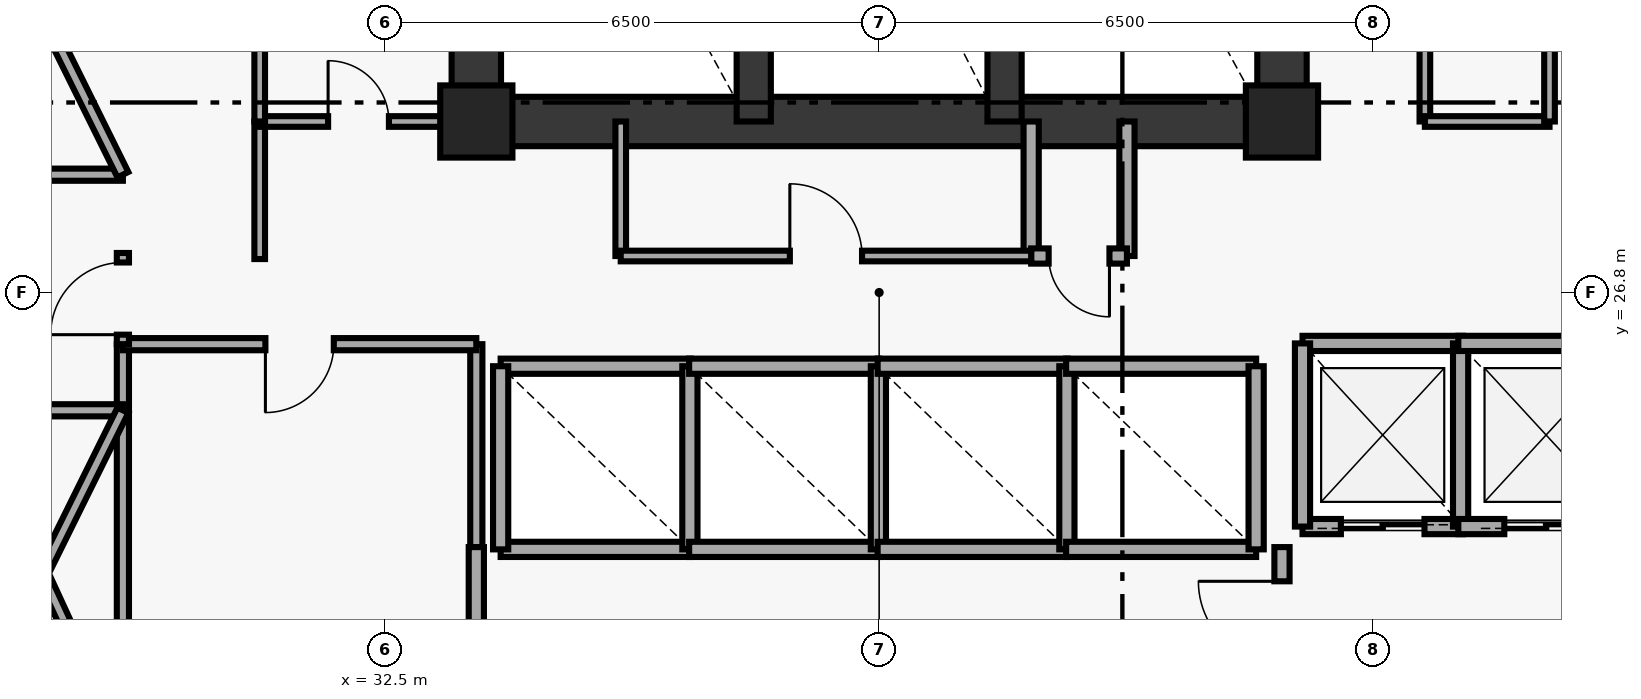
"""IFC4 building model, lengths in metres.
Left out: names, types, materials, properties, quantities, classifications, styles, units other than length and angle.
Written with IfcOpenShell. Run it as: python <this file> out.ifc"""

import sys

from ifc_helpers import new_model, si_unit, direction, frame, frame_2d, origin, origin_2d, place, context, subcontext, project, spatial, rectangle, extrude, element, fill, save


model = new_model("IFC4")
c1 = context("Model", 3, precision=1e-05, world=origin(), true_north=direction((0.0, 1.0)))
c2 = subcontext(c1, "Body", "Model", "MODEL_VIEW")
j1 = project(units=[si_unit("LENGTHUNIT", "METRE"), si_unit("PLANEANGLEUNIT", "RADIAN")], contexts=[c1])
p1 = place(None, origin())
s1 = spatial("IfcSite", under=j1, at=p1, CompositionType="ELEMENT")
p2 = place(p1, origin())
s2 = spatial("IfcBuilding", under=s1, at=p2, CompositionType="ELEMENT")
p3 = place(p2, frame((0.0, 0.0, 192.25)))
s3 = spatial("IfcBuildingStorey", under=s2, at=p3, CompositionType="ELEMENT", Elevation=192.25)
for number, where, z_axis, x_axis in (
    (1, (44.3, 29.05, 0.0), (0.0, 0.0, 1.0), (1.0, 0.0, 0.0)),
    (2, (33.7, 29.05, 0.0), (0.0, 0.0, 1.0), (1.0, 0.0, 0.0)),
):
    element("IfcColumn", number, at=place(p3, frame(where, z_axis=z_axis, x_axis=x_axis)), inside=s3, PredefinedType="PILASTER", context=c2, shape_type="SweptSolid", body=[
        extrude(rectangle(XDim=0.95, YDim=0.95, at=origin_2d()), origin(), (0.0, 0.0, 1.0), 3.35),
    ])
for number, where, z_axis, x_axis in (
    (3, (33.7, 29.05, 0.0), (0.0, 0.0, 1.0), (0.0, 1.0, 0.0)),
    (4, (44.3, 29.05, 0.0), (0.0, 0.0, 1.0), (0.0, 1.0, 0.0)),
):
    element("IfcWall", number, at=place(p3, frame(where, z_axis=z_axis, x_axis=x_axis)), inside=s3, PredefinedType="SHEAR", context=c2, shape_type="SweptSolid", body=[
        extrude(rectangle(XDim=8.35, YDim=0.65, at=frame_2d((4.175, 0.0))), origin(), (0.0, 0.0, 1.0), 3.35),
    ])
p4 = place(p3, frame((33.7, 29.05, 0.0), z_axis=(0.0, 0.0, 1.0), x_axis=(1.0, 0.0, 0.0)))
e5 = element("IfcWall", 5, at=p4, inside=s3, PredefinedType="SHEAR", context=c2, shape_type="SweptSolid", body=[
    extrude(rectangle(XDim=10.6, YDim=0.65, at=frame_2d((5.3, 0.0))), origin(), (0.0, 0.0, 1.0), 3.35),
])
for number, where, z_axis, x_axis in (
    (6, (37.35, 29.05, 0.0), (0.0, 0.0, 1.0), (0.0, 1.0, 0.0)),
    (7, (40.65, 29.05, 0.0), (0.0, 0.0, 1.0), (0.0, 1.0, 0.0)),
):
    element("IfcWall", number, at=place(p3, frame(where, z_axis=z_axis, x_axis=x_axis)), inside=s3, PredefinedType="SHEAR", context=c2, shape_type="SweptSolid", body=[
        extrude(rectangle(XDim=8.35, YDim=0.45, at=frame_2d((4.175, 0.0))), origin(), (0.0, 0.0, 1.0), 3.35),
    ])
p5 = place(p3, frame((35.6, 27.28, 0.0), z_axis=(0.0, 0.0, 1.0), x_axis=(0.0, 1.0, 0.0)))
e8 = element("IfcWall", 8, at=p5, inside=s3, PredefinedType="PARTITIONING", context=c2, shape_type="SweptSolid", body=[
    extrude(rectangle(XDim=1.77, YDim=0.14, at=frame_2d((0.885, 0.0))), origin(), (0.0, 0.0, 1.0), 3.35),
])
for number, where, z_axis, x_axis in (
    (9, (41.0, 27.28, 0.0), (0.0, 0.0, 1.0), (0.0, 1.0, 0.0)),
    (10, (42.26, 27.28, 0.0), (0.0, 0.0, 1.0), (0.0, 1.0, 0.0)),
):
    element("IfcWall", number, at=place(p3, frame(where, z_axis=z_axis, x_axis=x_axis)), inside=s3, PredefinedType="SOLIDWALL", context=c2, shape_type="SweptSolid", body=[
        extrude(rectangle(XDim=1.77, YDim=0.2, at=frame_2d((0.885, 0.0))), origin(), (0.0, 0.0, 1.0), 3.35),
    ])
p6 = place(p3, frame((41.0, 27.28, 0.0), z_axis=(0.0, 0.0, 1.0), x_axis=(1.0, 0.0, 0.0)))
e11 = element("IfcWall", 11, at=p6, inside=s3, PredefinedType="SOLIDWALL", context=c2, shape_type="SweptSolid", body=[
    extrude(rectangle(XDim=1.26, YDim=0.2, at=frame_2d((0.63, 0.0))), origin(), (0.0, 0.0, 1.0), 3.35),
])
p7 = place(p6, frame((0.23, 0.0, 0.0)))
e12 = element("IfcOpeningElement", 12, at=p7, cuts=e11, PredefinedType="OPENING", context=c2, shape_type="SweptSolid", body=[
    extrude(rectangle(XDim=0.8, YDim=2.05, at=frame_2d((0.4, 1.025))), frame((0.0, 0.11, 0.0), z_axis=(0.0, -1.0, 0.0), x_axis=(1.0, 0.0, 0.0)), (0.0, 0.0, 1.0), 0.22),
])
p8 = place(p3, frame((44.57, 23.72, 0.0), z_axis=(0.0, 0.0, 1.0), x_axis=(1.0, 0.0, 0.0)))
e13 = element("IfcWall", 13, at=p8, inside=s3, PredefinedType="SOLIDWALL", context=c2, shape_type="SweptSolid", body=[
    extrude(rectangle(XDim=2.11, YDim=0.2, at=frame_2d((1.055, 0.0))), origin(), (0.0, 0.0, 1.0), 3.35),
])
p9 = place(p8, frame((0.505, 0.0, 0.0)))
e14 = element("IfcOpeningElement", 14, at=p9, cuts=e13, PredefinedType="OPENING", context=c2, shape_type="SweptSolid", body=[
    extrude(rectangle(XDim=1.1, YDim=2.15, at=frame_2d((0.55, 1.075))), frame((0.0, 0.11, 0.0), z_axis=(0.0, -1.0, 0.0), x_axis=(1.0, 0.0, 0.0)), (0.0, 0.0, 1.0), 0.22),
])
p10 = place(p3, frame((44.57, 26.13, 0.0), z_axis=(0.0, 0.0, 1.0), x_axis=(1.0, 0.0, 0.0)))
e15 = element("IfcWall", 15, at=p10, inside=s3, PredefinedType="SOLIDWALL", context=c2, shape_type="SweptSolid", body=[
    extrude(rectangle(XDim=2.11, YDim=0.2, at=frame_2d((1.055, 0.0))), origin(), (0.0, 0.0, 1.0), 3.35),
])
for number, where, z_axis, x_axis in (
    (16, (44.57, 23.72, 0.0), (0.0, 0.0, 1.0), (0.0, 1.0, 0.0)),
    (17, (46.65, 23.72, 0.0), (0.0, 0.0, 1.0), (0.0, 1.0, 0.0)),
):
    element("IfcWall", number, at=place(p3, frame(where, z_axis=z_axis, x_axis=x_axis)), inside=s3, PredefinedType="SOLIDWALL", context=c2, shape_type="SweptSolid", body=[
        extrude(rectangle(XDim=2.41, YDim=0.2, at=frame_2d((1.205, 0.0))), origin(), (0.0, 0.0, 1.0), 3.35),
    ])
p11 = place(p3, frame((46.62, 23.72, 0.0), z_axis=(0.0, 0.0, 1.0), x_axis=(1.0, 0.0, 0.0)))
e18 = element("IfcWall", 18, at=p11, inside=s3, PredefinedType="SOLIDWALL", context=c2, shape_type="SweptSolid", body=[
    extrude(rectangle(XDim=2.31, YDim=0.2, at=frame_2d((1.155, 0.0))), origin(), (0.0, 0.0, 1.0), 3.35),
])
p12 = place(p11, frame((0.605, 0.0, 0.0)))
e19 = element("IfcOpeningElement", 19, at=p12, cuts=e18, PredefinedType="OPENING", context=c2, shape_type="SweptSolid", body=[
    extrude(rectangle(XDim=1.1, YDim=2.15, at=frame_2d((0.55, 1.075))), frame((0.0, 0.11, 0.0), z_axis=(0.0, -1.0, 0.0), x_axis=(1.0, 0.0, 0.0)), (0.0, 0.0, 1.0), 0.22),
])
p13 = place(p3, frame((46.62, 26.13, 0.0), z_axis=(0.0, 0.0, 1.0), x_axis=(1.0, 0.0, 0.0)))
e20 = element("IfcWall", 20, at=p13, inside=s3, PredefinedType="SOLIDWALL", context=c2, shape_type="SweptSolid", body=[
    extrude(rectangle(XDim=2.31, YDim=0.2, at=frame_2d((1.155, 0.0))), origin(), (0.0, 0.0, 1.0), 3.35),
])
for number, where, z_axis, x_axis in (
    (21, (34.02, 23.42, 0.0), (0.0, 0.0, 1.0), (1.0, 0.0, 0.0)),
    (22, (34.02, 25.83, 0.0), (0.0, 0.0, 1.0), (1.0, 0.0, 0.0)),
):
    element("IfcWall", number, at=place(p3, frame(where, z_axis=z_axis, x_axis=x_axis)), inside=s3, PredefinedType="SOLIDWALL", context=c2, shape_type="SweptSolid", body=[
        extrude(rectangle(XDim=2.5, YDim=0.2, at=frame_2d((1.25, 0.0))), origin(), (0.0, 0.0, 1.0), 3.35),
    ])
for number, where, z_axis, x_axis in (
    (23, (34.02, 23.42, 0.0), (0.0, 0.0, 1.0), (0.0, 1.0, 0.0)),
    (24, (36.51, 23.42, 0.0), (0.0, 0.0, 1.0), (0.0, 1.0, 0.0)),
):
    element("IfcWall", number, at=place(p3, frame(where, z_axis=z_axis, x_axis=x_axis)), inside=s3, PredefinedType="SOLIDWALL", context=c2, shape_type="SweptSolid", body=[
        extrude(rectangle(XDim=2.41, YDim=0.2, at=frame_2d((1.205, 0.0))), origin(), (0.0, 0.0, 1.0), 3.35),
    ])
for number, where, z_axis, x_axis in (
    (25, (36.5, 23.42, 0.0), (0.0, 0.0, 1.0), (1.0, 0.0, 0.0)),
    (26, (36.5, 25.83, 0.0), (0.0, 0.0, 1.0), (1.0, 0.0, 0.0)),
):
    element("IfcWall", number, at=place(p3, frame(where, z_axis=z_axis, x_axis=x_axis)), inside=s3, PredefinedType="SOLIDWALL", context=c2, shape_type="SweptSolid", body=[
        extrude(rectangle(XDim=2.5, YDim=0.2, at=frame_2d((1.25, 0.0))), origin(), (0.0, 0.0, 1.0), 3.35),
    ])
p14 = place(p3, frame((38.99, 23.42, 0.0), z_axis=(0.0, 0.0, 1.0), x_axis=(0.0, 1.0, 0.0)))
e27 = element("IfcWall", 27, at=p14, inside=s3, PredefinedType="SOLIDWALL", context=c2, shape_type="SweptSolid", body=[
    extrude(rectangle(XDim=2.41, YDim=0.2, at=frame_2d((1.205, 0.0))), origin(), (0.0, 0.0, 1.0), 3.35),
])
for number, where, z_axis, x_axis in (
    (28, (38.98, 23.42, 0.0), (0.0, 0.0, 1.0), (1.0, 0.0, 0.0)),
    (29, (38.98, 25.83, 0.0), (0.0, 0.0, 1.0), (1.0, 0.0, 0.0)),
):
    element("IfcWall", number, at=place(p3, frame(where, z_axis=z_axis, x_axis=x_axis)), inside=s3, PredefinedType="SOLIDWALL", context=c2, shape_type="SweptSolid", body=[
        extrude(rectangle(XDim=2.5, YDim=0.2, at=frame_2d((1.25, 0.0))), origin(), (0.0, 0.0, 1.0), 3.35),
    ])
p15 = place(p3, frame((41.47, 23.42, 0.0), z_axis=(0.0, 0.0, 1.0), x_axis=(0.0, 1.0, 0.0)))
e30 = element("IfcWall", 30, at=p15, inside=s3, PredefinedType="SOLIDWALL", context=c2, shape_type="SweptSolid", body=[
    extrude(rectangle(XDim=2.41, YDim=0.2, at=frame_2d((1.205, 0.0))), origin(), (0.0, 0.0, 1.0), 3.35),
])
for number, where, z_axis, x_axis in (
    (31, (41.46, 23.42, 0.0), (0.0, 0.0, 1.0), (1.0, 0.0, 0.0)),
    (32, (41.46, 25.83, 0.0), (0.0, 0.0, 1.0), (1.0, 0.0, 0.0)),
):
    element("IfcWall", number, at=place(p3, frame(where, z_axis=z_axis, x_axis=x_axis)), inside=s3, PredefinedType="SOLIDWALL", context=c2, shape_type="SweptSolid", body=[
        extrude(rectangle(XDim=2.5, YDim=0.2, at=frame_2d((1.25, 0.0))), origin(), (0.0, 0.0, 1.0), 3.35),
    ])
p16 = place(p3, frame((43.96, 23.42, 0.0), z_axis=(0.0, 0.0, 1.0), x_axis=(0.0, 1.0, 0.0)))
e33 = element("IfcWall", 33, at=p16, inside=s3, PredefinedType="SOLIDWALL", context=c2, shape_type="SweptSolid", body=[
    extrude(rectangle(XDim=2.41, YDim=0.2, at=frame_2d((1.205, 0.0))), origin(), (0.0, 0.0, 1.0), 3.35),
])
p17 = place(p3, frame((29.05, 19.05, 0.0), z_axis=(0.0, 0.0, 1.0), x_axis=(0.0, 1.0, 0.0)))
e34 = element("IfcWall", 34, at=p17, inside=s3, PredefinedType="PARTITIONING", context=c2, shape_type="SweptSolid", body=[
    extrude(rectangle(XDim=7.07, YDim=0.16, at=frame_2d((3.535, 0.0))), origin(), (0.0, 0.0, 1.0), 3.35),
])
p18 = place(p3, frame((33.7, 23.45, 0.0), z_axis=(0.0, 0.0, 1.0), x_axis=(0.0, 1.0, 0.0)))
e35 = element("IfcWall", 35, at=p18, inside=s3, PredefinedType="PARTITIONING", context=c2, shape_type="SweptSolid", body=[
    extrude(rectangle(XDim=2.67, YDim=0.16, at=frame_2d((1.335, 0.0))), origin(), (0.0, 0.0, 1.0), 2.735),
])
p19 = place(p3, frame((33.7, 26.12, 0.0), z_axis=(0.0, 0.0, 1.0), x_axis=(-1.0, 0.0, 0.0)))
e36 = element("IfcWall", 36, at=p19, inside=s3, PredefinedType="PARTITIONING", context=c2, shape_type="SweptSolid", body=[
    extrude(rectangle(XDim=4.65, YDim=0.16, at=frame_2d((2.325, 0.0))), origin(), (0.0, 0.0, 1.0), 3.35),
])
p20 = place(p19, frame((1.875, 0.0, 0.0)))
e37 = element("IfcOpeningElement", 37, at=p20, cuts=e36, PredefinedType="OPENING", context=c2, shape_type="SweptSolid", body=[
    extrude(rectangle(XDim=0.9, YDim=2.1, at=frame_2d((0.45, 1.05))), frame((0.0, 0.09, 0.0), z_axis=(0.0, -1.0, 0.0), x_axis=(1.0, 0.0, 0.0)), (0.0, 0.0, 1.0), 0.18),
])
p21 = place(p3, frame((33.7, 21.3, 0.0), z_axis=(0.0, 0.0, 1.0), x_axis=(0.0, 1.0, 0.0)))
e38 = element("IfcWall", 38, at=p21, inside=s3, PredefinedType="SOLIDWALL", context=c2, shape_type="SweptSolid", body=[
    extrude(rectangle(XDim=2.15, YDim=0.2, at=frame_2d((1.075, 0.0))), origin(), (0.0, 0.0, 1.0), 2.735),
])
p22 = place(p3, frame((44.3, 21.35, 0.0), z_axis=(0.0, 0.0, 1.0), x_axis=(0.0, 1.0, 0.0)))
e39 = element("IfcWall", 39, at=p22, inside=s3, PredefinedType="SOLIDWALL", context=c2, shape_type="SweptSolid", body=[
    extrude(rectangle(XDim=2.1, YDim=0.2, at=frame_2d((1.05, 0.0))), origin(), (0.0, 0.0, 1.0), 2.735),
])
p23 = place(p22, frame((0.55, 0.0, 0.0)))
e40 = element("IfcOpeningElement", 40, at=p23, cuts=e39, PredefinedType="OPENING", context=c2, shape_type="SweptSolid", body=[
    extrude(rectangle(XDim=1.1, YDim=2.15, at=frame_2d((0.55, 1.075))), frame((0.0, 0.11, 0.0), z_axis=(0.0, -1.0, 0.0), x_axis=(1.0, 0.0, 0.0)), (0.0, 0.0, 1.0), 0.22),
])
p24 = place(p3, frame((29.05, 26.12, 0.0), z_axis=(0.0, 0.0, 1.0), x_axis=(0.0, 1.0, 0.0)))
e41 = element("IfcWall", 41, at=p24, inside=s3, PredefinedType="PARTITIONING", context=c2, shape_type="SweptSolid", body=[
    extrude(rectangle(XDim=1.2, YDim=0.16, at=frame_2d((0.6, 0.0))), origin(), (0.0, 0.0, 1.0), 3.35),
])
p25 = place(p24, frame((0.125, 0.0, 0.0)))
e42 = element("IfcOpeningElement", 42, at=p25, cuts=e41, PredefinedType="OPENING", context=c2, shape_type="SweptSolid", body=[
    extrude(rectangle(XDim=0.95, YDim=2.15, at=frame_2d((0.475, 1.075))), frame((0.0, 0.09, 0.0), z_axis=(0.0, -1.0, 0.0), x_axis=(1.0, 0.0, 0.0)), (0.0, 0.0, 1.0), 0.18),
])
p26 = place(p3, frame((35.6, 27.28, 0.0), z_axis=(0.0, 0.0, 1.0), x_axis=(1.0, 0.0, 0.0)))
e43 = element("IfcWall", 43, at=p26, inside=s3, PredefinedType="PARTITIONING", context=c2, shape_type="SweptSolid", body=[
    extrude(rectangle(XDim=5.4, YDim=0.14, at=frame_2d((2.7, 0.0))), origin(), (0.0, 0.0, 1.0), 3.35),
])
p27 = place(p26, frame((2.225, 0.0, 0.0)))
e44 = element("IfcOpeningElement", 44, at=p27, cuts=e43, PredefinedType="OPENING", context=c2, shape_type="SweptSolid", body=[
    extrude(rectangle(XDim=0.95, YDim=2.1, at=frame_2d((0.475, 1.05))), frame((0.0, 0.08, 0.0), z_axis=(0.0, -1.0, 0.0), x_axis=(1.0, 0.0, 0.0)), (0.0, 0.0, 1.0), 0.16),
])
p28 = place(p3, frame((30.85, 27.24, 0.0), z_axis=(0.0, 0.0, 1.0), x_axis=(0.0, 1.0, 0.0)))
e45 = element("IfcWall", 45, at=p28, inside=s3, PredefinedType="PARTITIONING", context=c2, shape_type="SweptSolid", body=[
    extrude(rectangle(XDim=1.81, YDim=0.14, at=frame_2d((0.905, 0.0))), origin(), (0.0, 0.0, 1.0), 3.35),
])
p29 = place(p3, frame((30.85, 29.05, 0.0), z_axis=(0.0, 0.0, 1.0), x_axis=(1.0, 0.0, 0.0)))
e46 = element("IfcWall", 46, at=p29, inside=s3, PredefinedType="PARTITIONING", context=c2, shape_type="SweptSolid", body=[
    extrude(rectangle(XDim=2.6, YDim=0.14, at=frame_2d((1.3, 0.0))), origin(), (0.0, 0.0, 1.0), 2.31),
])
p30 = place(p29, frame((0.9, 0.0, 0.0)))
e47 = element("IfcOpeningElement", 47, at=p30, cuts=e46, PredefinedType="OPENING", context=c2, shape_type="SweptSolid", body=[
    extrude(rectangle(XDim=0.8, YDim=2.05, at=frame_2d((0.4, 1.025))), frame((0.0, 0.08, 0.0), z_axis=(0.0, -1.0, 0.0), x_axis=(1.0, 0.0, 0.0)), (0.0, 0.0, 1.0), 0.16),
])
p31 = place(p3, frame((30.85, 29.05, 0.0), z_axis=(0.0, 0.0, 1.0), x_axis=(0.0, 1.0, 0.0)))
e48 = element("IfcWall", 48, at=p31, inside=s3, PredefinedType="PARTITIONING", context=c2, shape_type="SweptSolid", body=[
    extrude(rectangle(XDim=5.6, YDim=0.14, at=frame_2d((2.8, 0.0))), origin(), (0.0, 0.0, 1.0), 3.35),
])
p32 = place(p3, frame((46.18, 34.05, 0.0), z_axis=(0.0, 0.0, 1.0), x_axis=(0.0, -1.0, 0.0)))
e49 = element("IfcWall", 49, at=p32, inside=s3, PredefinedType="PARTITIONING", context=c2, shape_type="SweptSolid", body=[
    extrude(rectangle(XDim=5.0, YDim=0.14, at=frame_2d((2.5, 0.0))), origin(), (0.0, 0.0, 1.0), 3.35),
])
p33 = place(p32, frame((2.1, 0.0, 0.0)))
e50 = element("IfcOpeningElement", 50, at=p33, cuts=e49, PredefinedType="OPENING", context=c2, shape_type="SweptSolid", body=[
    extrude(rectangle(XDim=0.8, YDim=2.05, at=frame_2d((0.4, 1.025))), frame((0.0, 0.08, 0.0), z_axis=(0.0, -1.0, 0.0), x_axis=(1.0, 0.0, 0.0)), (0.0, 0.0, 1.0), 0.16),
])
p34 = place(p3, frame((46.18, 29.05, 0.0), z_axis=(0.0, 0.0, 1.0), x_axis=(1.0, 0.0, 0.0)))
e51 = element("IfcWall", 51, at=p34, inside=s3, PredefinedType="PARTITIONING", context=c2, shape_type="SweptSolid", body=[
    extrude(rectangle(XDim=1.64, YDim=0.14, at=frame_2d((0.82, 0.0))), origin(), (0.0, 0.0, 1.0), 3.35),
])
p35 = place(p3, frame((47.82, 29.05, 0.0), z_axis=(0.0, 0.0, 1.0), x_axis=(0.0, 1.0, 0.0)))
e52 = element("IfcWall", 52, at=p35, inside=s3, PredefinedType="PARTITIONING", context=c2, shape_type="SweptSolid", body=[
    extrude(rectangle(XDim=5.0, YDim=0.14, at=frame_2d((2.5, 0.0))), origin(), (0.0, 0.0, 1.0), 3.35),
])
p36 = place(p3, frame((27.988, 23.104, 0.0), z_axis=(0.0, 0.0, 1.0), x_axis=(0.418656179426, -0.908144814128, 0.0)))
e53 = element("IfcWall", 53, at=p36, inside=s3, PredefinedType="PARTITIONING", context=c2, shape_type="SweptSolid", body=[
    extrude(rectangle(XDim=7.049, YDim=0.16, at=frame_2d((3.524, 0.0))), origin(), (0.0, 0.0, 1.0), 3.35),
])
p37 = place(p3, frame((26.05, 28.35, 0.0), z_axis=(0.0, 0.0, 1.0), x_axis=(1.0, 0.0, 0.0)))
e54 = element("IfcWall", 54, at=p37, inside=s3, PredefinedType="PARTITIONING", context=c2, shape_type="SweptSolid", body=[
    extrude(rectangle(XDim=3.0, YDim=0.16, at=frame_2d((1.5, 0.0))), origin(), (0.0, 0.0, 1.0), 2.31),
])
p38 = place(p37, frame((0.65, 0.0, 0.0)))
e55 = element("IfcOpeningElement", 55, at=p38, cuts=e54, PredefinedType="OPENING", context=c2, shape_type="SweptSolid", body=[
    extrude(rectangle(XDim=1.05, YDim=2.15, at=frame_2d((0.525, 1.075))), frame((0.0, 0.09, 0.0), z_axis=(0.0, -1.0, 0.0), x_axis=(1.0, 0.0, 0.0)), (0.0, 0.0, 1.0), 0.18),
])
p39 = place(p3, frame((26.05, 25.25, 0.0), z_axis=(0.0, 0.0, 1.0), x_axis=(1.0, 0.0, 0.0)))
e56 = element("IfcWall", 56, at=p39, inside=s3, PredefinedType="PARTITIONING", context=c2, shape_type="SweptSolid", body=[
    extrude(rectangle(XDim=3.0, YDim=0.16, at=frame_2d((1.5, 0.0))), origin(), (0.0, 0.0, 1.0), 3.35),
])
p40 = place(p39, frame((0.65, 0.0, 0.0)))
e57 = element("IfcOpeningElement", 57, at=p40, cuts=e56, PredefinedType="OPENING", context=c2, shape_type="SweptSolid", body=[
    extrude(rectangle(XDim=1.05, YDim=2.15, at=frame_2d((0.525, 1.075))), frame((0.0, 0.09, 0.0), z_axis=(0.0, -1.0, 0.0), x_axis=(1.0, 0.0, 0.0)), (0.0, 0.0, 1.0), 0.18),
])
for number, where, z_axis, x_axis in (
    (58, (27.988, 30.496, 0.0), (0.0, 0.0, 1.0), (0.444, -0.896, 0.0)),
    (59, (27.988, 23.104, 0.0), (0.0, 0.0, 1.0), (0.444, 0.896, 0.0)),
):
    element("IfcWall", number, at=place(p3, frame(where, z_axis=z_axis, x_axis=x_axis)), inside=s3, PredefinedType="PARTITIONING", context=c2, shape_type="SweptSolid", body=[
        extrude(rectangle(XDim=2.394, YDim=0.16, at=frame_2d((1.197, 0.0))), origin(), (0.0, 0.0, 1.0), 3.35),
    ])
p41 = place(p7, origin())
e60 = element("IfcDoor", 60, at=p41, inside=s3, OperationType="SINGLE_SWING_RIGHT", PredefinedType="DOOR", context=c2, shape_type="SweptSolid", body=[
    extrude(rectangle(XDim=0.8, YDim=2.05, at=frame_2d((0.4, 1.025))), frame((0.0, 0.025, 0.0), z_axis=(0.0, -1.0, 0.0), x_axis=(1.0, 0.0, 0.0)), (0.0, 0.0, 1.0), 0.05),
])
fill(e12, e60)
p42 = place(p9, origin())
e61 = element("IfcDoor", 61, at=p42, inside=s3, OperationType="DOUBLE_DOOR_SLIDING", PredefinedType="DOOR", context=c2, shape_type="SweptSolid", body=[
    extrude(rectangle(XDim=1.1, YDim=2.15, at=frame_2d((0.55, 1.075))), frame((0.0, 0.025, 0.0), z_axis=(0.0, -1.0, 0.0), x_axis=(1.0, 0.0, 0.0)), (0.0, 0.0, 1.0), 0.05),
])
fill(e14, e61)
p43 = place(p12, origin())
e62 = element("IfcDoor", 62, at=p43, inside=s3, OperationType="DOUBLE_DOOR_SLIDING", PredefinedType="DOOR", context=c2, shape_type="SweptSolid", body=[
    extrude(rectangle(XDim=1.1, YDim=2.15, at=frame_2d((0.55, 1.075))), frame((0.0, 0.025, 0.0), z_axis=(0.0, -1.0, 0.0), x_axis=(1.0, 0.0, 0.0)), (0.0, 0.0, 1.0), 0.05),
])
fill(e19, e62)
p44 = place(p20, origin())
e63 = element("IfcDoor", 63, at=p44, inside=s3, OperationType="SINGLE_SWING_RIGHT", PredefinedType="DOOR", context=c2, shape_type="SweptSolid", body=[
    extrude(rectangle(XDim=0.9, YDim=2.1, at=frame_2d((0.45, 1.05))), frame((0.0, 0.025, 0.0), z_axis=(0.0, -1.0, 0.0), x_axis=(1.0, 0.0, 0.0)), (0.0, 0.0, 1.0), 0.05),
])
fill(e37, e63)
p45 = place(p23, origin())
e64 = element("IfcDoor", 64, at=p45, inside=s3, OperationType="SINGLE_SWING_RIGHT", PredefinedType="DOOR", context=c2, shape_type="SweptSolid", body=[
    extrude(rectangle(XDim=1.1, YDim=2.15, at=frame_2d((0.55, 1.075))), frame((0.0, 0.025, 0.0), z_axis=(0.0, -1.0, 0.0), x_axis=(1.0, 0.0, 0.0)), (0.0, 0.0, 1.0), 0.05),
])
fill(e40, e64)
p46 = place(p25, origin())
e65 = element("IfcDoor", 65, at=p46, inside=s3, OperationType="SINGLE_SWING_RIGHT", PredefinedType="DOOR", context=c2, shape_type="SweptSolid", body=[
    extrude(rectangle(XDim=0.95, YDim=2.15, at=frame_2d((0.475, 1.075))), frame((0.0, 0.025, 0.0), z_axis=(0.0, -1.0, 0.0), x_axis=(1.0, 0.0, 0.0)), (0.0, 0.0, 1.0), 0.05),
])
fill(e42, e65)
p47 = place(p27, origin())
e66 = element("IfcDoor", 66, at=p47, inside=s3, OperationType="SINGLE_SWING_LEFT", PredefinedType="DOOR", context=c2, shape_type="SweptSolid", body=[
    extrude(rectangle(XDim=0.95, YDim=2.1, at=frame_2d((0.475, 1.05))), frame((0.0, 0.025, 0.0), z_axis=(0.0, -1.0, 0.0), x_axis=(1.0, 0.0, 0.0)), (0.0, 0.0, 1.0), 0.05),
])
fill(e44, e66)
p48 = place(p30, origin())
e67 = element("IfcDoor", 67, at=p48, inside=s3, OperationType="SINGLE_SWING_LEFT", PredefinedType="DOOR", context=c2, shape_type="SweptSolid", body=[
    extrude(rectangle(XDim=0.8, YDim=2.05, at=frame_2d((0.4, 1.025))), frame((0.0, 0.025, 0.0), z_axis=(0.0, -1.0, 0.0), x_axis=(1.0, 0.0, 0.0)), (0.0, 0.0, 1.0), 0.05),
])
fill(e47, e67)
save(model, sys.argv[1])
